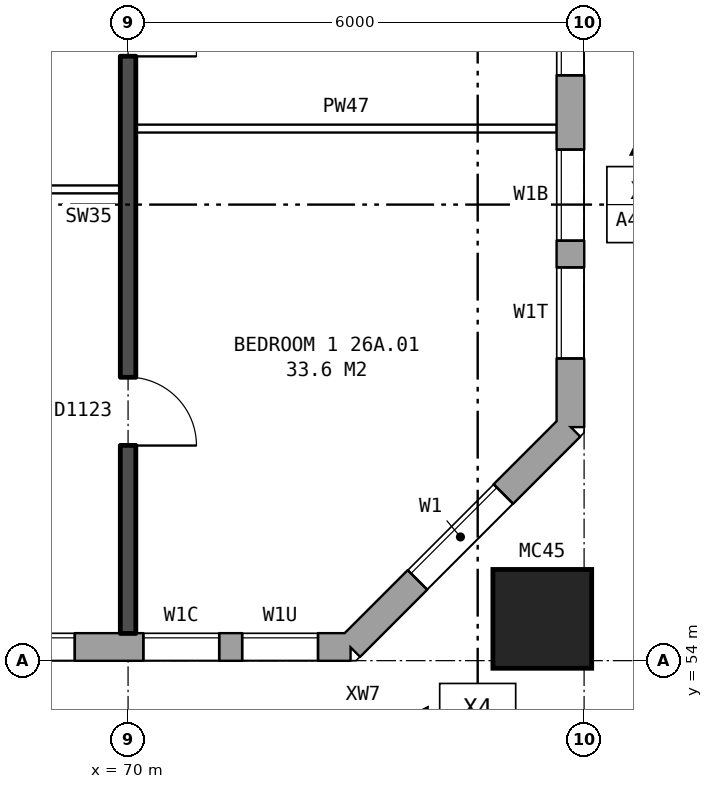
"""IFC4 building model, lengths in metres.
Left out: names, types, materials, properties, quantities, classifications, styles, units other than length and angle.
Written with IfcOpenShell. Run it as: python <this file> out.ifc"""

import sys

from ifc_helpers import new_model, si_unit, direction, frame, frame_2d, origin, origin_2d, place, context, subcontext, project, spatial, rectangle, hollow_rectangle, extrude, element, fill, save


model = new_model("IFC4")
c1 = context("Model", 3, precision=1e-05, world=origin(), true_north=direction((0.0, 1.0)))
c2 = subcontext(c1, "Body", "Model", "MODEL_VIEW")
j1 = project(units=[si_unit("LENGTHUNIT", "METRE"), si_unit("PLANEANGLEUNIT", "RADIAN")], contexts=[c1])
p1 = place(None, origin())
s1 = spatial("IfcSite", under=j1, at=p1, CompositionType="ELEMENT")
p2 = place(p1, origin())
s2 = spatial("IfcBuilding", under=s1, at=p2, CompositionType="ELEMENT")
p3 = place(p2, frame((0.0, 0.0, 96.4)))
s3 = spatial("IfcBuildingStorey", under=s2, at=p3, CompositionType="ELEMENT", Elevation=96.4)
p4 = place(p3, frame((75.45, 54.55, 0.0), z_axis=(0.0, 0.0, 1.0), x_axis=(1.0, 0.0, 0.0)))
e1 = element("IfcColumn", 1, at=p4, inside=s3, PredefinedType="COLUMN", context=c2, shape_type="SweptSolid", body=[
    extrude(hollow_rectangle(XDim=1.3, YDim=1.3, WallThickness=0.07, at=origin_2d()), origin(), (0.0, 0.0, 1.0), 3.1),
])
p5 = place(p3, frame((28.075, 54.18, 0.0), z_axis=(0.0, 0.0, 1.0), x_axis=(1.0, 0.0, 0.0)))
e2 = element("IfcWall", 2, at=p5, inside=s3, PredefinedType="STANDARD", context=c2, shape_type="SweptSolid", body=[
    extrude(rectangle(XDim=44.851, YDim=0.36, at=frame_2d((22.425, 0.0))), origin(), (0.0, 0.0, 1.0), 2.85),
])
p6 = place(p5, frame((0.4, 0.0, 0.8)))
e3 = element("IfcOpeningElement", 3, at=p6, cuts=e2, PredefinedType="OPENING", context=c2, shape_type="SweptSolid", body=[
    extrude(rectangle(XDim=0.8, YDim=0.9, at=frame_2d((0.4, 0.45))), frame((0.0, 0.19, 0.0), z_axis=(0.0, -1.0, 0.0), x_axis=(1.0, 0.0, 0.0)), (0.0, 0.0, 1.0), 0.38),
])
p7 = place(p5, frame((3.625, 0.0, 0.8)))
e4 = element("IfcOpeningElement", 4, at=p7, cuts=e2, PredefinedType="OPENING", context=c2, shape_type="SweptSolid", body=[
    extrude(rectangle(XDim=1.6, YDim=1.8, at=frame_2d((0.8, 0.9))), frame((0.0, 0.19, 0.0), z_axis=(0.0, -1.0, 0.0), x_axis=(1.0, 0.0, 0.0)), (0.0, 0.0, 1.0), 0.38),
])
p8 = place(p5, frame((6.625, 0.0, 0.8)))
e5 = element("IfcOpeningElement", 5, at=p8, cuts=e2, PredefinedType="OPENING", context=c2, shape_type="SweptSolid", body=[
    extrude(rectangle(XDim=1.6, YDim=1.8, at=frame_2d((0.8, 0.9))), frame((0.0, 0.19, 0.0), z_axis=(0.0, -1.0, 0.0), x_axis=(1.0, 0.0, 0.0)), (0.0, 0.0, 1.0), 0.38),
])
p9 = place(p5, frame((9.625, 0.0, 0.8)))
e6 = element("IfcOpeningElement", 6, at=p9, cuts=e2, PredefinedType="OPENING", context=c2, shape_type="SweptSolid", body=[
    extrude(rectangle(XDim=1.6, YDim=1.8, at=frame_2d((0.8, 0.9))), frame((0.0, 0.19, 0.0), z_axis=(0.0, -1.0, 0.0), x_axis=(1.0, 0.0, 0.0)), (0.0, 0.0, 1.0), 0.38),
])
p10 = place(p5, frame((12.625, 0.0, 0.8)))
e7 = element("IfcOpeningElement", 7, at=p10, cuts=e2, PredefinedType="OPENING", context=c2, shape_type="SweptSolid", body=[
    extrude(rectangle(XDim=1.6, YDim=1.8, at=frame_2d((0.8, 0.9))), frame((0.0, 0.19, 0.0), z_axis=(0.0, -1.0, 0.0), x_axis=(1.0, 0.0, 0.0)), (0.0, 0.0, 1.0), 0.38),
])
p11 = place(p5, frame((15.625, 0.0, 0.8)))
e8 = element("IfcOpeningElement", 8, at=p11, cuts=e2, PredefinedType="OPENING", context=c2, shape_type="SweptSolid", body=[
    extrude(rectangle(XDim=1.6, YDim=1.8, at=frame_2d((0.8, 0.9))), frame((0.0, 0.19, 0.0), z_axis=(0.0, -1.0, 0.0), x_axis=(1.0, 0.0, 0.0)), (0.0, 0.0, 1.0), 0.38),
])
p12 = place(p5, frame((18.625, 0.0, 0.8)))
e9 = element("IfcOpeningElement", 9, at=p12, cuts=e2, PredefinedType="OPENING", context=c2, shape_type="SweptSolid", body=[
    extrude(rectangle(XDim=1.6, YDim=1.8, at=frame_2d((0.8, 0.9))), frame((0.0, 0.19, 0.0), z_axis=(0.0, -1.0, 0.0), x_axis=(1.0, 0.0, 0.0)), (0.0, 0.0, 1.0), 0.38),
])
p13 = place(p5, frame((21.625, 0.0, 0.8)))
e10 = element("IfcOpeningElement", 10, at=p13, cuts=e2, PredefinedType="OPENING", context=c2, shape_type="SweptSolid", body=[
    extrude(rectangle(XDim=1.6, YDim=1.8, at=frame_2d((0.8, 0.9))), frame((0.0, 0.19, 0.0), z_axis=(0.0, -1.0, 0.0), x_axis=(1.0, 0.0, 0.0)), (0.0, 0.0, 1.0), 0.38),
])
p14 = place(p5, frame((24.625, 0.0, 0.8)))
e11 = element("IfcOpeningElement", 11, at=p14, cuts=e2, PredefinedType="OPENING", context=c2, shape_type="SweptSolid", body=[
    extrude(rectangle(XDim=1.6, YDim=1.8, at=frame_2d((0.8, 0.9))), frame((0.0, 0.19, 0.0), z_axis=(0.0, -1.0, 0.0), x_axis=(1.0, 0.0, 0.0)), (0.0, 0.0, 1.0), 0.38),
])
p15 = place(p5, frame((27.625, 0.0, 0.8)))
e12 = element("IfcOpeningElement", 12, at=p15, cuts=e2, PredefinedType="OPENING", context=c2, shape_type="SweptSolid", body=[
    extrude(rectangle(XDim=1.6, YDim=1.8, at=frame_2d((0.8, 0.9))), frame((0.0, 0.19, 0.0), z_axis=(0.0, -1.0, 0.0), x_axis=(1.0, 0.0, 0.0)), (0.0, 0.0, 1.0), 0.38),
])
p16 = place(p5, frame((30.625, 0.0, 0.8)))
e13 = element("IfcOpeningElement", 13, at=p16, cuts=e2, PredefinedType="OPENING", context=c2, shape_type="SweptSolid", body=[
    extrude(rectangle(XDim=1.6, YDim=1.8, at=frame_2d((0.8, 0.9))), frame((0.0, 0.19, 0.0), z_axis=(0.0, -1.0, 0.0), x_axis=(1.0, 0.0, 0.0)), (0.0, 0.0, 1.0), 0.38),
])
p17 = place(p5, frame((33.625, 0.0, 0.8)))
e14 = element("IfcOpeningElement", 14, at=p17, cuts=e2, PredefinedType="OPENING", context=c2, shape_type="SweptSolid", body=[
    extrude(rectangle(XDim=1.6, YDim=1.8, at=frame_2d((0.8, 0.9))), frame((0.0, 0.19, 0.0), z_axis=(0.0, -1.0, 0.0), x_axis=(1.0, 0.0, 0.0)), (0.0, 0.0, 1.0), 0.38),
])
p18 = place(p5, frame((36.625, 0.0, 0.8)))
e15 = element("IfcOpeningElement", 15, at=p18, cuts=e2, PredefinedType="OPENING", context=c2, shape_type="SweptSolid", body=[
    extrude(rectangle(XDim=1.6, YDim=1.8, at=frame_2d((0.8, 0.9))), frame((0.0, 0.19, 0.0), z_axis=(0.0, -1.0, 0.0), x_axis=(1.0, 0.0, 0.0)), (0.0, 0.0, 1.0), 0.38),
])
p19 = place(p5, frame((39.625, 0.0, 0.8)))
e16 = element("IfcOpeningElement", 16, at=p19, cuts=e2, PredefinedType="OPENING", context=c2, shape_type="SweptSolid", body=[
    extrude(rectangle(XDim=1.6, YDim=1.8, at=frame_2d((0.8, 0.9))), frame((0.0, 0.19, 0.0), z_axis=(0.0, -1.0, 0.0), x_axis=(1.0, 0.0, 0.0)), (0.0, 0.0, 1.0), 0.38),
])
p20 = place(p5, frame((42.125, 0.0, 0.8)))
e17 = element("IfcOpeningElement", 17, at=p20, cuts=e2, PredefinedType="OPENING", context=c2, shape_type="SweptSolid", body=[
    extrude(rectangle(XDim=1.0, YDim=1.8, at=frame_2d((0.5, 0.9))), frame((0.0, 0.19, 0.0), z_axis=(0.0, -1.0, 0.0), x_axis=(1.0, 0.0, 0.0)), (0.0, 0.0, 1.0), 0.38),
])
p21 = place(p5, frame((1.65, 0.0, 0.8)))
e18 = element("IfcOpeningElement", 18, at=p21, cuts=e2, PredefinedType="OPENING", context=c2, shape_type="SweptSolid", body=[
    extrude(rectangle(XDim=1.6, YDim=1.8, at=frame_2d((0.8, 0.9))), frame((0.0, 0.19, 0.0), z_axis=(0.0, -1.0, 0.0), x_axis=(1.0, 0.0, 0.0)), (0.0, 0.0, 1.0), 0.38),
])
p22 = place(p5, frame((43.425, 0.0, 0.8)))
e19 = element("IfcOpeningElement", 19, at=p22, cuts=e2, PredefinedType="OPENING", context=c2, shape_type="SweptSolid", body=[
    extrude(rectangle(XDim=1.0, YDim=0.9, at=frame_2d((0.5, 0.45))), frame((0.0, 0.19, 0.0), z_axis=(0.0, -1.0, 0.0), x_axis=(1.0, 0.0, 0.0)), (0.0, 0.0, 1.0), 0.38),
])
p23 = place(p3, frame((72.925, 54.18, 0.0), z_axis=(0.0, 0.0, 1.0), x_axis=(0.707106781187, 0.707106781187, 0.0)))
e20 = element("IfcWall", 20, at=p23, inside=s3, PredefinedType="STANDARD", context=c2, shape_type="SweptSolid", body=[
    extrude(rectangle(XDim=4.094, YDim=0.36, at=frame_2d((2.047, 0.0))), origin(), (0.0, 0.0, 1.0), 2.85),
])
p24 = place(p23, frame((1.247, 0.0, 0.8)))
e21 = element("IfcOpeningElement", 21, at=p24, cuts=e20, PredefinedType="OPENING", context=c2, shape_type="SweptSolid", body=[
    extrude(rectangle(XDim=1.6, YDim=1.8, at=frame_2d((0.8, 0.9))), frame((0.0, 0.19, 0.0), z_axis=(0.0, -1.0, 0.0), x_axis=(1.0, 0.0, 0.0)), (0.0, 0.0, 1.0), 0.38),
])
p25 = place(p3, frame((75.82, 57.075, 0.0), z_axis=(0.0, 0.0, 1.0), x_axis=(0.0, 1.0, 0.0)))
e22 = element("IfcWall", 22, at=p25, inside=s3, PredefinedType="STANDARD", context=c2, shape_type="SweptSolid", body=[
    extrude(rectangle(XDim=25.851, YDim=0.36, at=frame_2d((12.925, 0.0))), origin(), (0.0, 0.0, 1.0), 2.85),
])
p26 = place(p25, frame((0.9, 0.0, 0.8)))
e23 = element("IfcOpeningElement", 23, at=p26, cuts=e22, PredefinedType="OPENING", context=c2, shape_type="SweptSolid", body=[
    extrude(rectangle(XDim=1.2, YDim=0.9, at=frame_2d((0.6, 0.45))), frame((0.0, 0.19, 0.0), z_axis=(0.0, -1.0, 0.0), x_axis=(1.0, 0.0, 0.0)), (0.0, 0.0, 1.0), 0.38),
])
p27 = place(p25, frame((4.625, 0.0, 0.8)))
e24 = element("IfcOpeningElement", 24, at=p27, cuts=e22, PredefinedType="OPENING", context=c2, shape_type="SweptSolid", body=[
    extrude(rectangle(XDim=1.6, YDim=1.8, at=frame_2d((0.8, 0.9))), frame((0.0, 0.19, 0.0), z_axis=(0.0, -1.0, 0.0), x_axis=(1.0, 0.0, 0.0)), (0.0, 0.0, 1.0), 0.38),
])
p28 = place(p25, frame((19.625, 0.0, 0.8)))
e25 = element("IfcOpeningElement", 25, at=p28, cuts=e22, PredefinedType="OPENING", context=c2, shape_type="SweptSolid", body=[
    extrude(rectangle(XDim=1.6, YDim=1.8, at=frame_2d((0.8, 0.9))), frame((0.0, 0.19, 0.0), z_axis=(0.0, -1.0, 0.0), x_axis=(1.0, 0.0, 0.0)), (0.0, 0.0, 1.0), 0.38),
])
p29 = place(p25, frame((21.525, 0.0, 0.8)))
e26 = element("IfcOpeningElement", 26, at=p29, cuts=e22, PredefinedType="OPENING", context=c2, shape_type="SweptSolid", body=[
    extrude(rectangle(XDim=1.4, YDim=1.8, at=frame_2d((0.7, 0.9))), frame((0.0, 0.19, 0.0), z_axis=(0.0, -1.0, 0.0), x_axis=(1.0, 0.0, 0.0)), (0.0, 0.0, 1.0), 0.38),
])
p30 = place(p25, frame((2.45, 0.0, 0.8)))
e27 = element("IfcOpeningElement", 27, at=p30, cuts=e22, PredefinedType="OPENING", context=c2, shape_type="SweptSolid", body=[
    extrude(rectangle(XDim=1.2, YDim=1.8, at=frame_2d((0.6, 0.9))), frame((0.0, 0.19, 0.0), z_axis=(0.0, -1.0, 0.0), x_axis=(1.0, 0.0, 0.0)), (0.0, 0.0, 1.0), 0.38),
])
p31 = place(p25, frame((23.225, 0.0, 0.8)))
e28 = element("IfcOpeningElement", 28, at=p31, cuts=e22, PredefinedType="OPENING", context=c2, shape_type="SweptSolid", body=[
    extrude(rectangle(XDim=1.0, YDim=1.2, at=frame_2d((0.5, 0.6))), frame((0.0, 0.19, 0.0), z_axis=(0.0, -1.0, 0.0), x_axis=(1.0, 0.0, 0.0)), (0.0, 0.0, 1.0), 0.38),
])
p32 = place(p3, frame((64.1, 60.2, 0.0), z_axis=(0.0, 0.0, 1.0), x_axis=(1.0, 0.0, 0.0)))
e29 = element("IfcWall", 29, at=p32, inside=s3, PredefinedType="PARTITIONING", context=c2, shape_type="SweptSolid", body=[
    extrude(rectangle(XDim=5.8, YDim=0.1, at=frame_2d((2.9, 0.0))), origin(), (0.0, 0.0, 1.0), 2.85),
])
p33 = place(p32, frame((3.6, 0.0, 0.0)))
e30 = element("IfcOpeningElement", 30, at=p33, cuts=e29, PredefinedType="OPENING", context=c2, shape_type="SweptSolid", body=[
    extrude(rectangle(XDim=0.9, YDim=2.1, at=frame_2d((0.45, 1.05))), frame((0.0, 0.06, 0.0), z_axis=(0.0, -1.0, 0.0), x_axis=(1.0, 0.0, 0.0)), (0.0, 0.0, 1.0), 0.12),
])
p34 = place(p32, frame((0.7, 0.0, 0.0)))
e31 = element("IfcOpeningElement", 31, at=p34, cuts=e29, PredefinedType="OPENING", context=c2, shape_type="SweptSolid", body=[
    extrude(rectangle(XDim=0.9, YDim=2.1, at=frame_2d((0.45, 1.05))), frame((0.0, 0.06, 0.0), z_axis=(0.0, -1.0, 0.0), x_axis=(1.0, 0.0, 0.0)), (0.0, 0.0, 1.0), 0.12),
])
p35 = place(p3, frame((70.1, 61.0, 0.0), z_axis=(0.0, 0.0, 1.0), x_axis=(1.0, 0.0, 0.0)))
e32 = element("IfcWall", 32, at=p35, inside=s3, PredefinedType="PARTITIONING", context=c2, shape_type="SweptSolid", body=[
    extrude(rectangle(XDim=5.54, YDim=0.1, at=frame_2d((2.77, 0.0))), origin(), (0.0, 0.0, 1.0), 2.85),
])
p36 = place(p3, frame((70.0, 54.36, 0.0), z_axis=(0.0, 0.0, 1.0), x_axis=(0.0, 1.0, 0.0)))
e33 = element("IfcWall", 33, at=p36, inside=s3, PredefinedType="SOLIDWALL", context=c2, shape_type="SweptSolid", body=[
    extrude(rectangle(XDim=9.44, YDim=0.2, at=frame_2d((4.72, 0.0))), origin(), (0.0, 0.0, 1.0), 2.85),
])
p37 = place(p36, frame((2.47, 0.0, 0.0)))
e34 = element("IfcOpeningElement", 34, at=p37, cuts=e33, PredefinedType="OPENING", context=c2, shape_type="SweptSolid", body=[
    extrude(rectangle(XDim=0.9, YDim=2.1, at=frame_2d((0.45, 1.05))), frame((0.0, 0.11, 0.0), z_axis=(0.0, -1.0, 0.0), x_axis=(1.0, 0.0, 0.0)), (0.0, 0.0, 1.0), 0.22),
])
p38 = place(p36, frame((7.59, 0.0, 0.0)))
e35 = element("IfcOpeningElement", 35, at=p38, cuts=e33, PredefinedType="OPENING", context=c2, shape_type="SweptSolid", body=[
    extrude(rectangle(XDim=0.9, YDim=2.1, at=frame_2d((0.45, 1.05))), frame((0.0, 0.11, 0.0), z_axis=(0.0, -1.0, 0.0), x_axis=(1.0, 0.0, 0.0)), (0.0, 0.0, 1.0), 0.22),
])
p39 = place(p19, origin())
e36 = element("IfcWindow", 36, at=p39, inside=s3, PartitioningType="SINGLE_PANEL", PredefinedType="WINDOW", context=c2, shape_type="SweptSolid", body=[
    extrude(rectangle(XDim=1.6, YDim=1.8, at=frame_2d((0.8, 0.9))), frame((0.0, 0.15, 0.0), z_axis=(0.0, -1.0, 0.0), x_axis=(1.0, 0.0, 0.0)), (0.0, 0.0, 1.0), 0.06),
])
fill(e16, e36)
p40 = place(p20, origin())
e37 = element("IfcWindow", 37, at=p40, inside=s3, PartitioningType="SINGLE_PANEL", PredefinedType="WINDOW", context=c2, shape_type="SweptSolid", body=[
    extrude(rectangle(XDim=1.0, YDim=1.8, at=frame_2d((0.5, 0.9))), frame((0.0, 0.15, 0.0), z_axis=(0.0, -1.0, 0.0), x_axis=(1.0, 0.0, 0.0)), (0.0, 0.0, 1.0), 0.06),
])
fill(e17, e37)
p41 = place(p24, origin())
e38 = element("IfcWindow", 38, at=p41, inside=s3, PartitioningType="SINGLE_PANEL", PredefinedType="WINDOW", context=c2, shape_type="SweptSolid", body=[
    extrude(rectangle(XDim=1.6, YDim=1.8, at=frame_2d((0.8, 0.9))), frame((0.0, 0.15, 0.0), z_axis=(0.0, -1.0, 0.0), x_axis=(1.0, 0.0, 0.0)), (0.0, 0.0, 1.0), 0.06),
])
fill(e21, e38)
p42 = place(p26, origin())
e39 = element("IfcWindow", 39, at=p42, inside=s3, PartitioningType="SINGLE_PANEL", PredefinedType="WINDOW", context=c2, shape_type="SweptSolid", body=[
    extrude(rectangle(XDim=1.2, YDim=0.9, at=frame_2d((0.6, 0.45))), frame((0.0, 0.15, 0.0), z_axis=(0.0, -1.0, 0.0), x_axis=(1.0, 0.0, 0.0)), (0.0, 0.0, 1.0), 0.06),
])
fill(e23, e39)
p43 = place(p27, origin())
e40 = element("IfcWindow", 40, at=p43, inside=s3, PartitioningType="SINGLE_PANEL", PredefinedType="WINDOW", context=c2, shape_type="SweptSolid", body=[
    extrude(rectangle(XDim=1.6, YDim=1.8, at=frame_2d((0.8, 0.9))), frame((0.0, 0.15, 0.0), z_axis=(0.0, -1.0, 0.0), x_axis=(1.0, 0.0, 0.0)), (0.0, 0.0, 1.0), 0.06),
])
fill(e24, e40)
p44 = place(p37, frame((0.9, 0.0, 0.0), z_axis=(0.0, 0.0, 1.0), x_axis=(-1.0, 0.0, 0.0)))
e41 = element("IfcDoor", 41, at=p44, inside=s3, OperationType="SINGLE_SWING_RIGHT", PredefinedType="DOOR", context=c2, shape_type="SweptSolid", body=[
    extrude(rectangle(XDim=0.9, YDim=2.1, at=frame_2d((0.45, 1.05))), frame((0.0, 0.025, 0.0), z_axis=(0.0, -1.0, 0.0), x_axis=(1.0, 0.0, 0.0)), (0.0, 0.0, 1.0), 0.05),
])
fill(e34, e41)
p45 = place(p38, frame((0.9, 0.0, 0.0), z_axis=(0.0, 0.0, 1.0), x_axis=(-1.0, 0.0, 0.0)))
e42 = element("IfcDoor", 42, at=p45, inside=s3, OperationType="SINGLE_SWING_RIGHT", PredefinedType="DOOR", context=c2, shape_type="SweptSolid", body=[
    extrude(rectangle(XDim=0.9, YDim=2.1, at=frame_2d((0.45, 1.05))), frame((0.0, 0.025, 0.0), z_axis=(0.0, -1.0, 0.0), x_axis=(1.0, 0.0, 0.0)), (0.0, 0.0, 1.0), 0.05),
])
fill(e35, e42)
p46 = place(p22, origin())
e43 = element("IfcWindow", 43, at=p46, inside=s3, PartitioningType="SINGLE_PANEL", PredefinedType="WINDOW", context=c2, shape_type="SweptSolid", body=[
    extrude(rectangle(XDim=1.0, YDim=0.9, at=frame_2d((0.5, 0.45))), frame((0.0, 0.15, 0.0), z_axis=(0.0, -1.0, 0.0), x_axis=(1.0, 0.0, 0.0)), (0.0, 0.0, 1.0), 0.06),
])
fill(e19, e43)
p47 = place(p30, origin())
e44 = element("IfcWindow", 44, at=p47, inside=s3, PartitioningType="SINGLE_PANEL", PredefinedType="WINDOW", context=c2, shape_type="SweptSolid", body=[
    extrude(rectangle(XDim=1.2, YDim=1.8, at=frame_2d((0.6, 0.9))), frame((0.0, 0.15, 0.0), z_axis=(0.0, -1.0, 0.0), x_axis=(1.0, 0.0, 0.0)), (0.0, 0.0, 1.0), 0.06),
])
fill(e27, e44)
save(model, sys.argv[1])
